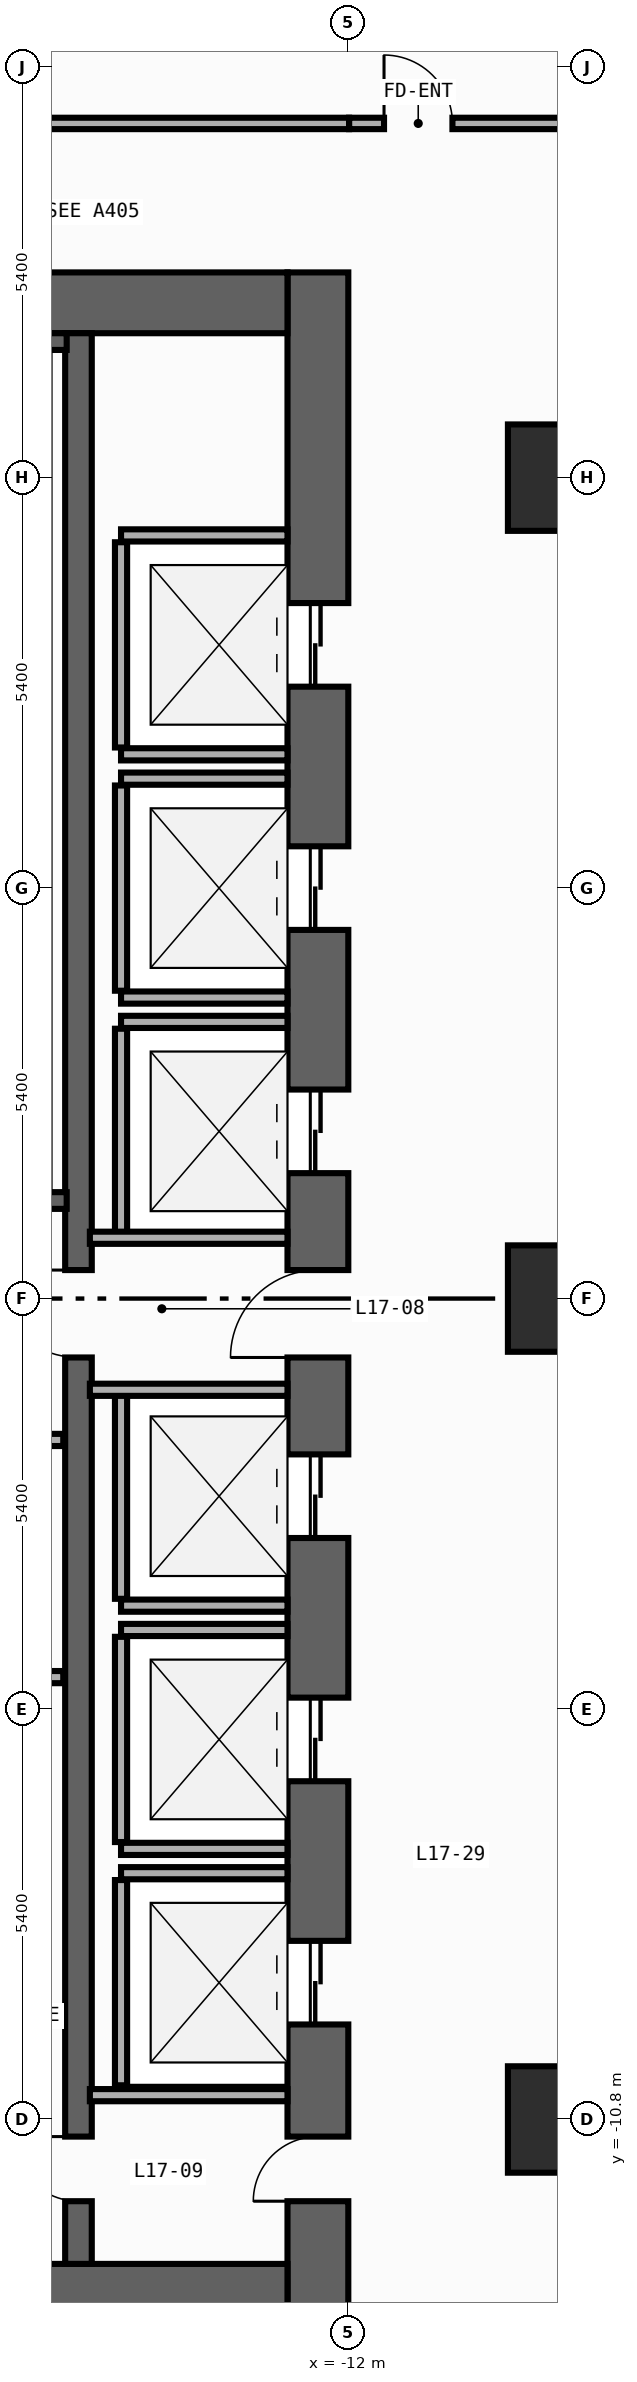
"""IFC4 building model, lengths in metres.
Left out: names, types, materials, properties, quantities, classifications, styles, units other than length and angle.
Written with IfcOpenShell. Run it as: python <this file> out.ifc"""

import sys

from ifc_helpers import new_model, si_unit, direction, frame, frame_2d, origin, origin_2d, place, context, subcontext, project, spatial, rectangle, extrude, element, fill, save


model = new_model("IFC4")
c1 = context("Model", 3, precision=1e-05, world=origin(), true_north=direction((0.0, 1.0)))
c2 = subcontext(c1, "Body", "Model", "MODEL_VIEW")
j1 = project(units=[si_unit("LENGTHUNIT", "METRE"), si_unit("PLANEANGLEUNIT", "RADIAN")], contexts=[c1])
p1 = place(None, origin())
s1 = spatial("IfcSite", under=j1, at=p1, CompositionType="ELEMENT")
p2 = place(p1, origin())
s2 = spatial("IfcBuilding", under=s1, at=p2, CompositionType="ELEMENT")
p3 = place(p2, frame((0.0, 0.0, 72.2)))
s3 = spatial("IfcBuildingStorey", under=s2, at=p3, CompositionType="ELEMENT", Elevation=72.2)
p4 = place(p3, frame((-12.4, -13.5, 0.0), z_axis=(0.0, 0.0, 1.0), x_axis=(0.0, 1.0, 0.0)))
e1 = element("IfcWall", 1, at=p4, inside=s3, PredefinedType="SHEAR", context=c2, shape_type="SweptSolid", body=[
    extrude(rectangle(XDim=27.0, YDim=0.8, at=frame_2d((13.5, 0.0))), origin(), (0.0, 0.0, 1.0), 3.94),
])
p5 = place(p4, frame((21.55, 0.0, 0.0)))
e2 = element("IfcOpeningElement", 2, at=p5, cuts=e1, PredefinedType="OPENING", context=c2, shape_type="SweptSolid", body=[
    extrude(rectangle(XDim=1.1, YDim=2.2, at=frame_2d((0.55, 1.1))), frame((0.0, 0.41, 0.0), z_axis=(0.0, -1.0, 0.0), x_axis=(1.0, 0.0, 0.0)), (0.0, 0.0, 1.0), 0.82),
])
p6 = place(p4, frame((18.35, 0.0, 0.0)))
e3 = element("IfcOpeningElement", 3, at=p6, cuts=e1, PredefinedType="OPENING", context=c2, shape_type="SweptSolid", body=[
    extrude(rectangle(XDim=1.1, YDim=2.2, at=frame_2d((0.55, 1.1))), frame((0.0, 0.41, 0.0), z_axis=(0.0, -1.0, 0.0), x_axis=(1.0, 0.0, 0.0)), (0.0, 0.0, 1.0), 0.82),
])
p7 = place(p4, frame((15.15, 0.0, 0.0)))
e4 = element("IfcOpeningElement", 4, at=p7, cuts=e1, PredefinedType="OPENING", context=c2, shape_type="SweptSolid", body=[
    extrude(rectangle(XDim=1.1, YDim=2.2, at=frame_2d((0.55, 1.1))), frame((0.0, 0.41, 0.0), z_axis=(0.0, -1.0, 0.0), x_axis=(1.0, 0.0, 0.0)), (0.0, 0.0, 1.0), 0.82),
])
p8 = place(p4, frame((10.35, 0.0, 0.0)))
e5 = element("IfcOpeningElement", 5, at=p8, cuts=e1, PredefinedType="OPENING", context=c2, shape_type="SweptSolid", body=[
    extrude(rectangle(XDim=1.1, YDim=2.2, at=frame_2d((0.55, 1.1))), frame((0.0, 0.41, 0.0), z_axis=(0.0, -1.0, 0.0), x_axis=(1.0, 0.0, 0.0)), (0.0, 0.0, 1.0), 0.82),
])
p9 = place(p4, frame((7.15, 0.0, 0.0)))
e6 = element("IfcOpeningElement", 6, at=p9, cuts=e1, PredefinedType="OPENING", context=c2, shape_type="SweptSolid", body=[
    extrude(rectangle(XDim=1.1, YDim=2.2, at=frame_2d((0.55, 1.1))), frame((0.0, 0.41, 0.0), z_axis=(0.0, -1.0, 0.0), x_axis=(1.0, 0.0, 0.0)), (0.0, 0.0, 1.0), 0.82),
])
p10 = place(p4, frame((3.95, 0.0, 0.0)))
e7 = element("IfcOpeningElement", 7, at=p10, cuts=e1, PredefinedType="OPENING", context=c2, shape_type="SweptSolid", body=[
    extrude(rectangle(XDim=1.1, YDim=2.2, at=frame_2d((0.55, 1.1))), frame((0.0, 0.41, 0.0), z_axis=(0.0, -1.0, 0.0), x_axis=(1.0, 0.0, 0.0)), (0.0, 0.0, 1.0), 0.82),
])
p11 = place(p4, frame((12.725, 0.0, 0.0)))
e8 = element("IfcOpeningElement", 8, at=p11, cuts=e1, PredefinedType="OPENING", context=c2, shape_type="SweptSolid", body=[
    extrude(rectangle(XDim=1.15, YDim=2.2, at=frame_2d((0.575, 1.1))), frame((0.0, 0.41, 0.0), z_axis=(0.0, -1.0, 0.0), x_axis=(1.0, 0.0, 0.0)), (0.0, 0.0, 1.0), 0.82),
])
p12 = place(p4, frame((1.625, 0.0, 0.0)))
e9 = element("IfcOpeningElement", 9, at=p12, cuts=e1, PredefinedType="OPENING", context=c2, shape_type="SweptSolid", body=[
    extrude(rectangle(XDim=0.85, YDim=2.1, at=frame_2d((0.425, 1.05))), frame((0.0, 0.41, 0.0), z_axis=(0.0, -1.0, 0.0), x_axis=(1.0, 0.0, 0.0)), (0.0, 0.0, 1.0), 0.82),
])
for number, where, z_axis, x_axis in (
    (10, (-19.6, -13.1, 0.0), (0.0, 0.0, 1.0), (1.0, 0.0, 0.0)),
    (11, (-19.6, 13.1, 0.0), (0.0, 0.0, 1.0), (1.0, 0.0, 0.0)),
):
    element("IfcWall", number, at=place(p3, frame(where, z_axis=z_axis, x_axis=x_axis)), inside=s3, PredefinedType="SHEAR", context=c2, shape_type="SweptSolid", body=[
        extrude(rectangle(XDim=6.8, YDim=0.8, at=frame_2d((3.4, 0.0))), origin(), (0.0, 0.0, 1.0), 3.94),
    ])
p13 = place(p3, frame((-15.55, -12.7, 0.0), z_axis=(0.0, 0.0, 1.0), x_axis=(0.0, 1.0, 0.0)))
e12 = element("IfcWall", 12, at=p13, inside=s3, PredefinedType="SHEAR", context=c2, shape_type="SweptSolid", body=[
    extrude(rectangle(XDim=25.4, YDim=0.35, at=frame_2d((12.7, 0.0))), origin(), (0.0, 0.0, 1.0), 3.94),
])
p14 = place(p13, frame((11.925, 0.0, 0.0)))
e13 = element("IfcOpeningElement", 13, at=p14, cuts=e12, PredefinedType="OPENING", context=c2, shape_type="SweptSolid", body=[
    extrude(rectangle(XDim=1.15, YDim=2.2, at=frame_2d((0.575, 1.1))), frame((0.0, 0.185, 0.0), z_axis=(0.0, -1.0, 0.0), x_axis=(1.0, 0.0, 0.0)), (0.0, 0.0, 1.0), 0.37),
])
p15 = place(p13, frame((0.825, 0.0, 0.0)))
e14 = element("IfcOpeningElement", 14, at=p15, cuts=e12, PredefinedType="OPENING", context=c2, shape_type="SweptSolid", body=[
    extrude(rectangle(XDim=0.85, YDim=2.1, at=frame_2d((0.425, 1.05))), frame((0.0, 0.185, 0.0), z_axis=(0.0, -1.0, 0.0), x_axis=(1.0, 0.0, 0.0)), (0.0, 0.0, 1.0), 0.37),
])
p16 = place(p3, frame((-19.62, 12.59, 0.0), z_axis=(0.0, 0.0, 1.0), x_axis=(1.0, 0.0, 0.0)))
e15 = element("IfcWall", 15, at=p16, inside=s3, PredefinedType="SHEAR", context=c2, shape_type="SweptSolid", body=[
    extrude(rectangle(XDim=3.915, YDim=0.22, at=frame_2d((1.958, 0.0))), origin(), (0.0, 0.0, 1.0), 3.94),
])
p17 = place(p3, frame((-19.62, 1.29, 0.0), z_axis=(0.0, 0.0, 1.0), x_axis=(1.0, 0.0, 0.0)))
e16 = element("IfcWall", 16, at=p17, inside=s3, PredefinedType="SHEAR", context=c2, shape_type="SweptSolid", body=[
    extrude(rectangle(XDim=3.915, YDim=0.22, at=frame_2d((1.958, 0.0))), origin(), (0.0, 0.0, 1.0), 3.94),
])
p18 = place(p17, frame((1.08, 0.0, 0.0)))
e17 = element("IfcOpeningElement", 17, at=p18, cuts=e16, PredefinedType="OPENING", context=c2, shape_type="SweptSolid", body=[
    extrude(rectangle(XDim=1.1, YDim=2.2, at=frame_2d((0.55, 1.1))), frame((0.0, 0.12, 0.0), z_axis=(0.0, -1.0, 0.0), x_axis=(1.0, 0.0, 0.0)), (0.0, 0.0, 1.0), 0.24),
])
for number, where, z_axis, x_axis in (
    (18, (-9.2, -10.8, 0.0), (0.0, 0.0, 1.0), (1.0, 0.0, 0.0)),
    (19, (-9.2, 0.0, 0.0), (0.0, 0.0, 1.0), (1.0, 0.0, 0.0)),
    (20, (-9.2, 10.8, 0.0), (0.0, 0.0, 1.0), (1.0, 0.0, 0.0)),
):
    element("IfcColumn", number, at=place(p3, frame(where, z_axis=z_axis, x_axis=x_axis)), inside=s3, PredefinedType="COLUMN", context=c2, shape_type="SweptSolid", body=[
        extrude(rectangle(XDim=1.4, YDim=1.4, at=origin_2d()), origin(), (0.0, 0.0, 1.0), 4.2),
    ])
for number, where, z_axis, x_axis in (
    (21, (-14.99, 7.16, 0.0), (0.0, 0.0, 1.0), (1.0, 0.0, 0.0)),
    (22, (-14.99, 10.04, 0.0), (0.0, 0.0, 1.0), (1.0, 0.0, 0.0)),
):
    element("IfcWall", number, at=place(p3, frame(where, z_axis=z_axis, x_axis=x_axis)), inside=s3, PredefinedType="STANDARD", context=c2, shape_type="SweptSolid", body=[
        extrude(rectangle(XDim=2.19, YDim=0.16, at=frame_2d((1.095, 0.0))), origin(), (0.0, 0.0, 1.0), 3.94),
    ])
p19 = place(p3, frame((-14.99, 7.25, 0.0), z_axis=(0.0, 0.0, 1.0), x_axis=(0.0, 1.0, 0.0)))
e23 = element("IfcWall", 23, at=p19, inside=s3, PredefinedType="STANDARD", context=c2, shape_type="SweptSolid", body=[
    extrude(rectangle(XDim=2.7, YDim=0.16, at=frame_2d((1.35, 0.0))), origin(), (0.0, 0.0, 1.0), 3.94),
])
for number, where, z_axis, x_axis in (
    (24, (-14.99, 3.96, 0.0), (0.0, 0.0, 1.0), (1.0, 0.0, 0.0)),
    (25, (-14.99, 6.84, 0.0), (0.0, 0.0, 1.0), (1.0, 0.0, 0.0)),
):
    element("IfcWall", number, at=place(p3, frame(where, z_axis=z_axis, x_axis=x_axis)), inside=s3, PredefinedType="STANDARD", context=c2, shape_type="SweptSolid", body=[
        extrude(rectangle(XDim=2.19, YDim=0.16, at=frame_2d((1.095, 0.0))), origin(), (0.0, 0.0, 1.0), 3.94),
    ])
p20 = place(p3, frame((-14.99, 4.05, 0.0), z_axis=(0.0, 0.0, 1.0), x_axis=(0.0, 1.0, 0.0)))
e26 = element("IfcWall", 26, at=p20, inside=s3, PredefinedType="STANDARD", context=c2, shape_type="SweptSolid", body=[
    extrude(rectangle(XDim=2.7, YDim=0.16, at=frame_2d((1.35, 0.0))), origin(), (0.0, 0.0, 1.0), 3.94),
])
p21 = place(p3, frame((-14.99, 3.64, 0.0), z_axis=(0.0, 0.0, 1.0), x_axis=(1.0, 0.0, 0.0)))
e27 = element("IfcWall", 27, at=p21, inside=s3, PredefinedType="STANDARD", context=c2, shape_type="SweptSolid", body=[
    extrude(rectangle(XDim=2.19, YDim=0.16, at=frame_2d((1.095, 0.0))), origin(), (0.0, 0.0, 1.0), 3.94),
])
p22 = place(p3, frame((-14.99, 0.85, 0.0), z_axis=(0.0, 0.0, 1.0), x_axis=(0.0, 1.0, 0.0)))
e28 = element("IfcWall", 28, at=p22, inside=s3, PredefinedType="STANDARD", context=c2, shape_type="SweptSolid", body=[
    extrude(rectangle(XDim=2.7, YDim=0.16, at=frame_2d((1.35, 0.0))), origin(), (0.0, 0.0, 1.0), 3.94),
])
p23 = place(p3, frame((-14.99, -4.04, 0.0), z_axis=(0.0, 0.0, 1.0), x_axis=(1.0, 0.0, 0.0)))
e29 = element("IfcWall", 29, at=p23, inside=s3, PredefinedType="STANDARD", context=c2, shape_type="SweptSolid", body=[
    extrude(rectangle(XDim=2.19, YDim=0.16, at=frame_2d((1.095, 0.0))), origin(), (0.0, 0.0, 1.0), 3.94),
])
p24 = place(p3, frame((-14.99, -3.95, 0.0), z_axis=(0.0, 0.0, 1.0), x_axis=(0.0, 1.0, 0.0)))
e30 = element("IfcWall", 30, at=p24, inside=s3, PredefinedType="STANDARD", context=c2, shape_type="SweptSolid", body=[
    extrude(rectangle(XDim=2.7, YDim=0.16, at=frame_2d((1.35, 0.0))), origin(), (0.0, 0.0, 1.0), 3.94),
])
for number, where, z_axis, x_axis in (
    (31, (-14.99, -7.24, 0.0), (0.0, 0.0, 1.0), (1.0, 0.0, 0.0)),
    (32, (-14.99, -4.36, 0.0), (0.0, 0.0, 1.0), (1.0, 0.0, 0.0)),
):
    element("IfcWall", number, at=place(p3, frame(where, z_axis=z_axis, x_axis=x_axis)), inside=s3, PredefinedType="STANDARD", context=c2, shape_type="SweptSolid", body=[
        extrude(rectangle(XDim=2.19, YDim=0.16, at=frame_2d((1.095, 0.0))), origin(), (0.0, 0.0, 1.0), 3.94),
    ])
p25 = place(p3, frame((-14.99, -7.15, 0.0), z_axis=(0.0, 0.0, 1.0), x_axis=(0.0, 1.0, 0.0)))
e33 = element("IfcWall", 33, at=p25, inside=s3, PredefinedType="STANDARD", context=c2, shape_type="SweptSolid", body=[
    extrude(rectangle(XDim=2.7, YDim=0.16, at=frame_2d((1.35, 0.0))), origin(), (0.0, 0.0, 1.0), 3.94),
])
p26 = place(p3, frame((-14.99, -7.56, 0.0), z_axis=(0.0, 0.0, 1.0), x_axis=(1.0, 0.0, 0.0)))
e34 = element("IfcWall", 34, at=p26, inside=s3, PredefinedType="STANDARD", context=c2, shape_type="SweptSolid", body=[
    extrude(rectangle(XDim=2.19, YDim=0.16, at=frame_2d((1.095, 0.0))), origin(), (0.0, 0.0, 1.0), 3.94),
])
p27 = place(p3, frame((-14.99, -10.35, 0.0), z_axis=(0.0, 0.0, 1.0), x_axis=(0.0, 1.0, 0.0)))
e35 = element("IfcWall", 35, at=p27, inside=s3, PredefinedType="STANDARD", context=c2, shape_type="SweptSolid", body=[
    extrude(rectangle(XDim=2.7, YDim=0.16, at=frame_2d((1.35, 0.0))), origin(), (0.0, 0.0, 1.0), 3.94),
])
p28 = place(p3, frame((-19.55, -1.86, 0.0), z_axis=(0.0, 0.0, 1.0), x_axis=(1.0, 0.0, 0.0)))
e36 = element("IfcWall", 36, at=p28, inside=s3, PredefinedType="STANDARD", context=c2, shape_type="SweptSolid", body=[
    extrude(rectangle(XDim=3.8, YDim=0.16, at=frame_2d((1.9, 0.0))), origin(), (0.0, 0.0, 1.0), 3.94),
])
p29 = place(p28, frame((1.18, 0.0, 0.0)))
e37 = element("IfcOpeningElement", 37, at=p29, cuts=e36, PredefinedType="OPENING", context=c2, shape_type="SweptSolid", body=[
    extrude(rectangle(XDim=1.15, YDim=2.2, at=frame_2d((0.575, 1.1))), frame((0.0, 0.09, 0.0), z_axis=(0.0, -1.0, 0.0), x_axis=(1.0, 0.0, 0.0)), (0.0, 0.0, 1.0), 0.18),
])
p30 = place(p3, frame((-19.55, -4.98, 0.0), z_axis=(0.0, 0.0, 1.0), x_axis=(1.0, 0.0, 0.0)))
e38 = element("IfcWall", 38, at=p30, inside=s3, PredefinedType="STANDARD", context=c2, shape_type="SweptSolid", body=[
    extrude(rectangle(XDim=3.8, YDim=0.16, at=frame_2d((1.9, 0.0))), origin(), (0.0, 0.0, 1.0), 3.94),
])
for number, where, z_axis, x_axis in (
    (39, (-15.4, 0.8, 0.0), (0.0, 0.0, 1.0), (1.0, 0.0, 0.0)),
    (40, (-15.4, -1.2, 0.0), (0.0, 0.0, 1.0), (1.0, 0.0, 0.0)),
    (41, (-15.4, -10.48, 0.0), (0.0, 0.0, 1.0), (1.0, 0.0, 0.0)),
):
    element("IfcWall", number, at=place(p3, frame(where, z_axis=z_axis, x_axis=x_axis)), inside=s3, PredefinedType="STANDARD", context=c2, shape_type="SweptSolid", body=[
        extrude(rectangle(XDim=2.6, YDim=0.16, at=frame_2d((1.3, 0.0))), origin(), (0.0, 0.0, 1.0), 3.94),
    ])
p31 = place(p3, frame((-11.99, 15.46, 0.0), z_axis=(0.0, 0.0, 1.0), x_axis=(1.0, 0.0, 0.0)))
e42 = element("IfcWall", 42, at=p31, inside=s3, PredefinedType="PARTITIONING", context=c2, shape_type="SweptSolid", body=[
    extrude(rectangle(XDim=3.15, YDim=0.15, at=frame_2d((1.575, 0.0))), origin(), (0.0, 0.0, 1.0), 3.94),
])
p32 = place(p31, frame((0.46, 0.0, 0.0)))
e43 = element("IfcOpeningElement", 43, at=p32, cuts=e42, PredefinedType="OPENING", context=c2, shape_type="SweptSolid", body=[
    extrude(rectangle(XDim=0.9, YDim=2.15, at=frame_2d((0.45, 1.075))), frame((0.0, 0.085, 0.0), z_axis=(0.0, -1.0, 0.0), x_axis=(1.0, 0.0, 0.0)), (0.0, 0.0, 1.0), 0.17),
])
p33 = place(p3, frame((-20.64, 15.46, 0.0), z_axis=(0.0, 0.0, 1.0), x_axis=(1.0, 0.0, 0.0)))
e44 = element("IfcWall", 44, at=p33, inside=s3, PredefinedType="PARTITIONING", context=c2, shape_type="SweptSolid", body=[
    extrude(rectangle(XDim=8.65, YDim=0.15, at=frame_2d((4.325, 0.0))), origin(), (0.0, 0.0, 1.0), 3.94),
])
p34 = place(p33, frame((2.871, 0.0, 0.0)))
e45 = element("IfcOpeningElement", 45, at=p34, cuts=e44, PredefinedType="OPENING", context=c2, shape_type="SweptSolid", body=[
    extrude(rectangle(XDim=0.9, YDim=2.15, at=frame_2d((0.45, 1.075))), frame((0.0, 0.085, 0.0), z_axis=(0.0, -1.0, 0.0), x_axis=(1.0, 0.0, 0.0)), (0.0, 0.0, 1.0), 0.17),
])
p35 = place(p5, origin())
e46 = element("IfcDoor", 46, at=p35, inside=s3, OperationType="DOUBLE_DOOR_SLIDING", PredefinedType="DOOR", context=c2, shape_type="SweptSolid", body=[
    extrude(rectangle(XDim=1.1, YDim=2.2, at=frame_2d((0.55, 1.1))), frame((0.0, 0.025, 0.0), z_axis=(0.0, -1.0, 0.0), x_axis=(1.0, 0.0, 0.0)), (0.0, 0.0, 1.0), 0.05),
])
fill(e2, e46)
p36 = place(p6, origin())
e47 = element("IfcDoor", 47, at=p36, inside=s3, OperationType="DOUBLE_DOOR_SLIDING", PredefinedType="DOOR", context=c2, shape_type="SweptSolid", body=[
    extrude(rectangle(XDim=1.1, YDim=2.2, at=frame_2d((0.55, 1.1))), frame((0.0, 0.025, 0.0), z_axis=(0.0, -1.0, 0.0), x_axis=(1.0, 0.0, 0.0)), (0.0, 0.0, 1.0), 0.05),
])
fill(e3, e47)
p37 = place(p7, origin())
e48 = element("IfcDoor", 48, at=p37, inside=s3, OperationType="DOUBLE_DOOR_SLIDING", PredefinedType="DOOR", context=c2, shape_type="SweptSolid", body=[
    extrude(rectangle(XDim=1.1, YDim=2.2, at=frame_2d((0.55, 1.1))), frame((0.0, 0.025, 0.0), z_axis=(0.0, -1.0, 0.0), x_axis=(1.0, 0.0, 0.0)), (0.0, 0.0, 1.0), 0.05),
])
fill(e4, e48)
p38 = place(p8, origin())
e49 = element("IfcDoor", 49, at=p38, inside=s3, OperationType="DOUBLE_DOOR_SLIDING", PredefinedType="DOOR", context=c2, shape_type="SweptSolid", body=[
    extrude(rectangle(XDim=1.1, YDim=2.2, at=frame_2d((0.55, 1.1))), frame((0.0, 0.025, 0.0), z_axis=(0.0, -1.0, 0.0), x_axis=(1.0, 0.0, 0.0)), (0.0, 0.0, 1.0), 0.05),
])
fill(e5, e49)
p39 = place(p9, origin())
e50 = element("IfcDoor", 50, at=p39, inside=s3, OperationType="DOUBLE_DOOR_SLIDING", PredefinedType="DOOR", context=c2, shape_type="SweptSolid", body=[
    extrude(rectangle(XDim=1.1, YDim=2.2, at=frame_2d((0.55, 1.1))), frame((0.0, 0.025, 0.0), z_axis=(0.0, -1.0, 0.0), x_axis=(1.0, 0.0, 0.0)), (0.0, 0.0, 1.0), 0.05),
])
fill(e6, e50)
p40 = place(p10, origin())
e51 = element("IfcDoor", 51, at=p40, inside=s3, OperationType="DOUBLE_DOOR_SLIDING", PredefinedType="DOOR", context=c2, shape_type="SweptSolid", body=[
    extrude(rectangle(XDim=1.1, YDim=2.2, at=frame_2d((0.55, 1.1))), frame((0.0, 0.025, 0.0), z_axis=(0.0, -1.0, 0.0), x_axis=(1.0, 0.0, 0.0)), (0.0, 0.0, 1.0), 0.05),
])
fill(e7, e51)
p41 = place(p11, origin())
e52 = element("IfcDoor", 52, at=p41, inside=s3, OperationType="SINGLE_SWING_LEFT", PredefinedType="DOOR", context=c2, shape_type="SweptSolid", body=[
    extrude(rectangle(XDim=1.15, YDim=2.2, at=frame_2d((0.575, 1.1))), frame((0.0, 0.025, 0.0), z_axis=(0.0, -1.0, 0.0), x_axis=(1.0, 0.0, 0.0)), (0.0, 0.0, 1.0), 0.05),
])
fill(e8, e52)
p42 = place(p14, origin())
e53 = element("IfcDoor", 53, at=p42, inside=s3, OperationType="SINGLE_SWING_RIGHT", PredefinedType="DOOR", context=c2, shape_type="SweptSolid", body=[
    extrude(rectangle(XDim=1.15, YDim=2.2, at=frame_2d((0.575, 1.1))), frame((0.0, 0.025, 0.0), z_axis=(0.0, -1.0, 0.0), x_axis=(1.0, 0.0, 0.0)), (0.0, 0.0, 1.0), 0.05),
])
fill(e13, e53)
p43 = place(p12, origin())
e54 = element("IfcDoor", 54, at=p43, inside=s3, OperationType="SINGLE_SWING_LEFT", PredefinedType="DOOR", context=c2, shape_type="SweptSolid", body=[
    extrude(rectangle(XDim=0.85, YDim=2.1, at=frame_2d((0.425, 1.05))), frame((0.0, 0.025, 0.0), z_axis=(0.0, -1.0, 0.0), x_axis=(1.0, 0.0, 0.0)), (0.0, 0.0, 1.0), 0.05),
])
fill(e9, e54)
p44 = place(p15, origin())
e55 = element("IfcDoor", 55, at=p44, inside=s3, OperationType="SINGLE_SWING_RIGHT", PredefinedType="DOOR", context=c2, shape_type="SweptSolid", body=[
    extrude(rectangle(XDim=0.85, YDim=2.1, at=frame_2d((0.425, 1.05))), frame((0.0, 0.025, 0.0), z_axis=(0.0, -1.0, 0.0), x_axis=(1.0, 0.0, 0.0)), (0.0, 0.0, 1.0), 0.05),
])
fill(e14, e55)
p45 = place(p32, origin())
e56 = element("IfcDoor", 56, at=p45, inside=s3, OperationType="SINGLE_SWING_LEFT", PredefinedType="DOOR", context=c2, shape_type="SweptSolid", body=[
    extrude(rectangle(XDim=0.9, YDim=2.15, at=frame_2d((0.45, 1.075))), frame((0.0, 0.025, 0.0), z_axis=(0.0, -1.0, 0.0), x_axis=(1.0, 0.0, 0.0)), (0.0, 0.0, 1.0), 0.05),
])
fill(e43, e56)
save(model, sys.argv[1])
